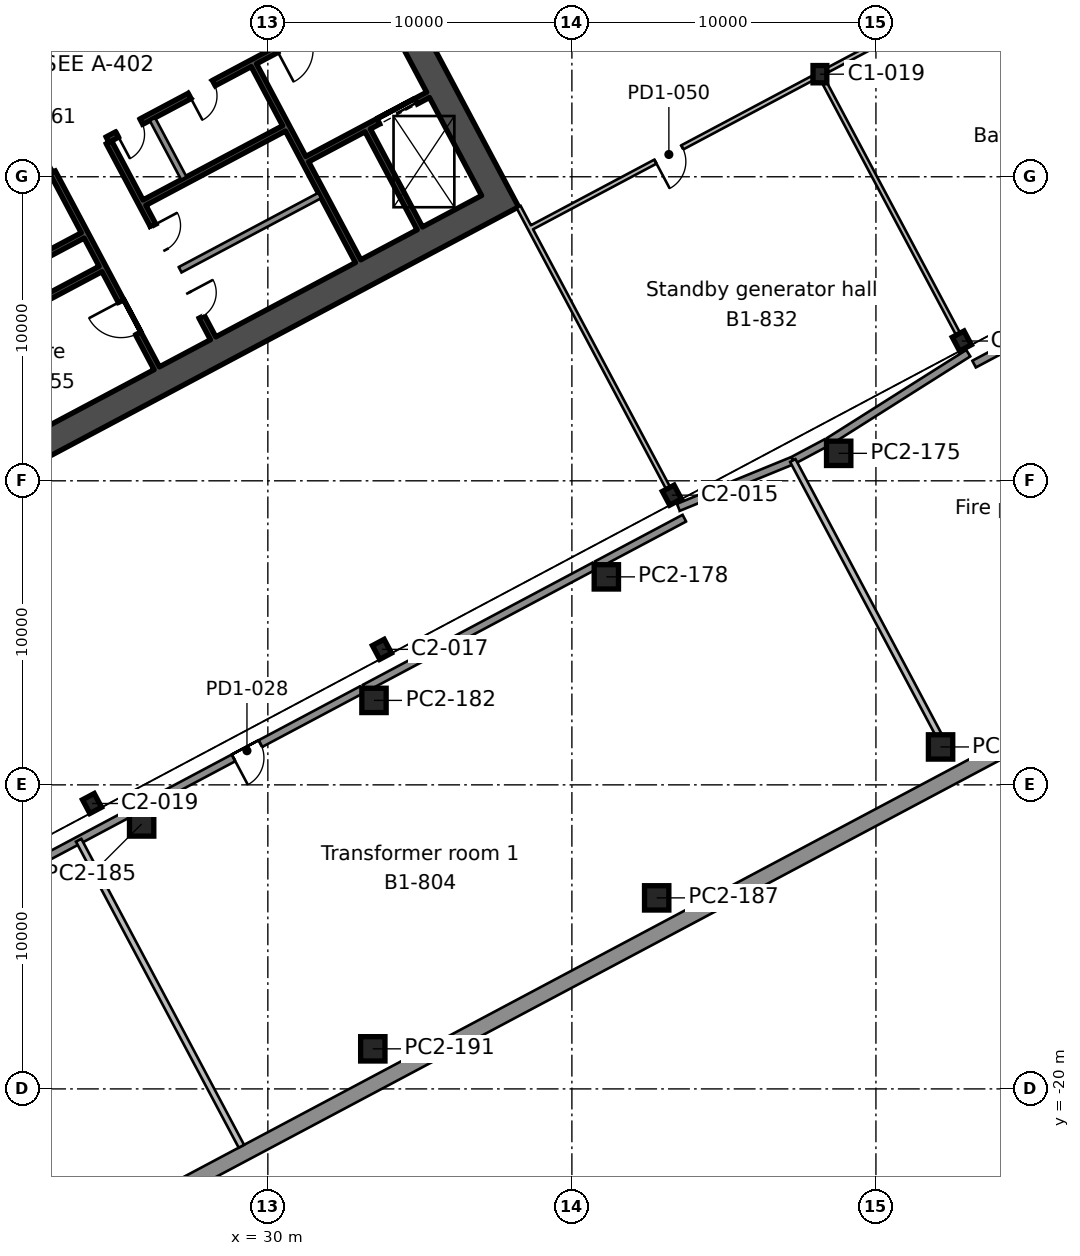
"""IFC4 building model, lengths in metres.
Left out: names, types, materials, properties, quantities, classifications, styles, units other than length and angle.
Written with IfcOpenShell. Run it as: python <this file> out.ifc"""

import sys

from ifc_helpers import new_model, si_unit, direction, frame, frame_2d, origin, origin_2d, place, context, subcontext, project, spatial, rectangle, i_section, extrude, element, fill, save


model = new_model("IFC4")
c1 = context("Model", 3, precision=1e-05, world=origin(), true_north=direction((0.0, 1.0)))
c2 = subcontext(c1, "Body", "Model", "MODEL_VIEW")
j1 = project(units=[si_unit("LENGTHUNIT", "METRE"), si_unit("PLANEANGLEUNIT", "RADIAN")], contexts=[c1])
p1 = place(None, origin())
s1 = spatial("IfcSite", under=j1, at=p1, CompositionType="ELEMENT")
p2 = place(p1, origin())
s2 = spatial("IfcBuilding", under=s1, at=p2, CompositionType="ELEMENT")
p3 = place(p2, frame((0.0, 0.0, -4.5)))
s3 = spatial("IfcBuildingStorey", under=s2, at=p3, CompositionType="ELEMENT", Elevation=-4.5)
for number, where, z_axis, x_axis in (
    (1, (24.217, -10.613, 0.0), (0.0, 0.0, 1.0), (0.883, 0.469, 0.0)),
    (2, (33.753, -5.543, 0.0), (0.0, 0.0, 1.0), (0.883, 0.469, 0.0)),
    (3, (43.289, -0.472, 0.0), (0.0, 0.0, 1.0), (0.883, 0.469, 0.0)),
    (4, (52.825, 4.598, 0.0), (0.0, 0.0, 1.0), (0.883, 0.469, 0.0)),
):
    element("IfcColumn", number, at=place(p3, frame(where, z_axis=z_axis, x_axis=x_axis)), inside=s3, PredefinedType="COLUMN", context=c2, shape_type="SweptSolid", body=[
        extrude(i_section(OverallWidth=0.437, OverallDepth=0.513, WebThickness=0.061, FlangeThickness=0.097, FilletRadius=0.015, at=origin_2d()), origin(), (0.0, 0.0, 1.0), 4.5),
    ])
p4 = place(p3, frame((48.158, 13.374, 0.0), z_axis=(0.0, 0.0, 1.0), x_axis=(1.0, 0.0, 0.0)))
e5 = element("IfcColumn", 5, at=p4, inside=s3, PredefinedType="COLUMN", context=c2, shape_type="SweptSolid", body=[
    extrude(i_section(OverallWidth=0.455, OverallDepth=0.569, WebThickness=0.078, FlangeThickness=0.125, FilletRadius=0.015, at=origin_2d()), origin(), (0.0, 0.0, 1.0), 4.5),
])
p5 = place(p3, frame((37.849, 8.799, 0.0), z_axis=(0.0, 0.0, 1.0), x_axis=(-0.469465789982, 0.882950662289, 0.0)))
e6 = element("IfcWall", 6, at=p5, inside=s3, PredefinedType="SHEAR", context=c2, shape_type="SweptSolid", body=[
    extrude(rectangle(XDim=20.0, YDim=0.9, at=frame_2d((10.0, 0.0))), origin(), (0.0, 0.0, 1.0), 4.5),
])
p6 = place(p5, frame((10.6, 0.0, 0.0)))
e7 = element("IfcOpeningElement", 7, at=p6, cuts=e6, PredefinedType="OPENING", context=c2, shape_type="SweptSolid", body=[
    extrude(rectangle(XDim=2.4, YDim=2.4, at=frame_2d((1.2, 1.2))), frame((0.0, 0.46, 0.0), z_axis=(0.0, -1.0, 0.0), x_axis=(1.0, 0.0, 0.0)), (0.0, 0.0, 1.0), 0.92),
])
p7 = place(p3, frame((19.405, -0.498, 0.0), z_axis=(0.0, 0.0, 1.0), x_axis=(0.88294509198, 0.469476266226, 0.0)))
e8 = element("IfcWall", 8, at=p7, inside=s3, PredefinedType="SHEAR", context=c2, shape_type="SweptSolid", body=[
    extrude(rectangle(XDim=20.2, YDim=0.9, at=frame_2d((10.1, 0.0))), origin(), (0.0, 0.0, 1.0), 4.5),
])
p8 = place(p3, frame((26.346, 3.702, 0.0), z_axis=(0.0, 0.0, 1.0), x_axis=(-0.469480409012, 0.88294288918, 0.0)))
e9 = element("IfcWall", 9, at=p8, inside=s3, PredefinedType="SHEAR", context=c2, shape_type="SweptSolid", body=[
    extrude(rectangle(XDim=7.3, YDim=0.2, at=frame_2d((3.65, 0.0))), origin(), (0.0, 0.0, 1.0), 4.5),
])
p9 = place(p8, frame((1.3, 0.0, 0.0)))
e10 = element("IfcOpeningElement", 10, at=p9, cuts=e9, PredefinedType="OPENING", context=c2, shape_type="SweptSolid", body=[
    extrude(rectangle(XDim=1.2, YDim=2.1, at=frame_2d((0.6, 1.05))), frame((0.0, 0.11, 0.0), z_axis=(0.0, -1.0, 0.0), x_axis=(1.0, 0.0, 0.0)), (0.0, 0.0, 1.0), 0.22),
])
p10 = place(p3, frame((28.2, 4.688, 0.0), z_axis=(0.0, 0.0, 1.0), x_axis=(-0.469454336211, 0.882956752176, 0.0)))
e11 = element("IfcWall", 11, at=p10, inside=s3, PredefinedType="SHEAR", context=c2, shape_type="SweptSolid", body=[
    extrude(rectangle(XDim=7.3, YDim=0.2, at=frame_2d((3.65, 0.0))), origin(), (0.0, 0.0, 1.0), 4.5),
])
p11 = place(p10, frame((0.8, 0.0, 0.0)))
e12 = element("IfcOpeningElement", 12, at=p11, cuts=e11, PredefinedType="OPENING", context=c2, shape_type="SweptSolid", body=[
    extrude(rectangle(XDim=0.9, YDim=2.1, at=frame_2d((0.45, 1.05))), frame((0.0, 0.11, 0.0), z_axis=(0.0, -1.0, 0.0), x_axis=(1.0, 0.0, 0.0)), (0.0, 0.0, 1.0), 0.22),
])
p12 = place(p10, frame((3.3, 0.0, 0.0)))
e13 = element("IfcOpeningElement", 13, at=p12, cuts=e11, PredefinedType="OPENING", context=c2, shape_type="SweptSolid", body=[
    extrude(rectangle(XDim=0.9, YDim=2.1, at=frame_2d((0.45, 1.05))), frame((0.0, 0.11, 0.0), z_axis=(0.0, -1.0, 0.0), x_axis=(1.0, 0.0, 0.0)), (0.0, 0.0, 1.0), 0.22),
])
p13 = place(p3, frame((27.236, 9.951, 0.0), z_axis=(0.0, 0.0, 1.0), x_axis=(-0.4694473164, 0.882960484464, 0.0)))
e14 = element("IfcWall", 14, at=p13, inside=s3, PredefinedType="SOLIDWALL", context=c2, shape_type="SweptSolid", body=[
    extrude(rectangle(XDim=2.2, YDim=0.2, at=frame_2d((1.1, 0.0))), origin(), (0.0, 0.0, 1.0), 4.5),
])
p14 = place(p3, frame((32.968, 7.223, 0.0), z_axis=(0.0, 0.0, 1.0), x_axis=(-0.469480409012, 0.88294288918, 0.0)))
e15 = element("IfcWall", 15, at=p14, inside=s3, PredefinedType="SHEAR", context=c2, shape_type="SweptSolid", body=[
    extrude(rectangle(XDim=7.3, YDim=0.2, at=frame_2d((3.65, 0.0))), origin(), (0.0, 0.0, 1.0), 4.5),
])
p15 = place(p3, frame((34.999, 8.303, 0.0), z_axis=(0.0, 0.0, 1.0), x_axis=(-0.4694665462, 0.882950260207, 0.0)))
e16 = element("IfcWall", 16, at=p15, inside=s3, PredefinedType="SHEAR", context=c2, shape_type="SweptSolid", body=[
    extrude(rectangle(XDim=3.65, YDim=0.2, at=frame_2d((1.825, 0.0))), origin(), (0.0, 0.0, 1.0), 4.5),
])
p16 = place(p3, frame((27.115, 6.942, 0.0), z_axis=(0.0, 0.0, 1.0), x_axis=(0.882934506056, 0.469496174655, 0.0)))
e17 = element("IfcWall", 17, at=p16, inside=s3, PredefinedType="SOLIDWALL", context=c2, shape_type="SweptSolid", body=[
    extrude(rectangle(XDim=5.2, YDim=0.2, at=frame_2d((2.6, 0.0))), origin(), (0.0, 0.0, 1.0), 4.5),
])
p17 = place(p3, frame((17.434, 3.21, 0.0), z_axis=(0.0, 0.0, 1.0), x_axis=(0.882940221191, 0.469485426614, 0.0)))
e18 = element("IfcWall", 18, at=p17, inside=s3, PredefinedType="SHEAR", context=c2, shape_type="SweptSolid", body=[
    extrude(rectangle(XDim=8.0, YDim=0.2, at=frame_2d((4.0, 0.0))), origin(), (0.0, 0.0, 1.0), 4.5),
])
p18 = place(p3, frame((31.296, 10.581, 0.0), z_axis=(0.0, 0.0, 1.0), x_axis=(0.882960433586, 0.469447412093, 0.0)))
e19 = element("IfcWall", 19, at=p18, inside=s3, PredefinedType="SHEAR", context=c2, shape_type="SweptSolid", body=[
    extrude(rectangle(XDim=4.5, YDim=0.2, at=frame_2d((2.25, 0.0))), origin(), (0.0, 0.0, 1.0), 4.5),
])
p19 = place(p18, frame((2.65, 0.0, 0.0)))
e20 = element("IfcOpeningElement", 20, at=p19, cuts=e19, PredefinedType="OPENING", context=c2, shape_type="SweptSolid", body=[
    extrude(rectangle(XDim=1.4, YDim=2.4, at=frame_2d((0.7, 1.2))), frame((0.0, 0.11, 0.0), z_axis=(0.0, -1.0, 0.0), x_axis=(1.0, 0.0, 0.0)), (0.0, 0.0, 1.0), 0.22),
])
p20 = place(p3, frame((16.847, 4.314, 0.0), z_axis=(0.0, 0.0, 1.0), x_axis=(0.882940221191, 0.469485426614, 0.0)))
e21 = element("IfcWall", 21, at=p20, inside=s3, PredefinedType="SHEAR", context=c2, shape_type="SweptSolid", body=[
    extrude(rectangle(XDim=8.0, YDim=0.2, at=frame_2d((4.0, 0.0))), origin(), (0.0, 0.0, 1.0), 4.5),
])
p21 = place(p3, frame((25.941, 9.15, 0.0), z_axis=(0.0, 0.0, 1.0), x_axis=(0.882953967957, 0.469459572775, 0.0)))
e22 = element("IfcWall", 22, at=p21, inside=s3, PredefinedType="SHEAR", context=c2, shape_type="SweptSolid", body=[
    extrude(rectangle(XDim=5.2, YDim=0.2, at=frame_2d((2.6, 0.0))), origin(), (0.0, 0.0, 1.0), 4.5),
])
p22 = place(p3, frame((24.726, 11.222, 0.0), z_axis=(0.0, 0.0, 1.0), x_axis=(0.882940221191, 0.469485426614, 0.0)))
e23 = element("IfcWall", 23, at=p22, inside=s3, PredefinedType="SHEAR", context=c2, shape_type="SweptSolid", body=[
    extrude(rectangle(XDim=10.0, YDim=0.2, at=frame_2d((5.0, 0.0))), origin(), (0.0, 0.0, 1.0), 4.5),
])
p23 = place(p22, frame((6.3, 0.0, 0.0)))
e24 = element("IfcOpeningElement", 24, at=p23, cuts=e23, PredefinedType="OPENING", context=c2, shape_type="SweptSolid", body=[
    extrude(rectangle(XDim=1.2, YDim=2.1, at=frame_2d((0.6, 1.05))), frame((0.0, 0.11, 0.0), z_axis=(0.0, -1.0, 0.0), x_axis=(1.0, 0.0, 0.0)), (0.0, 0.0, 1.0), 0.22),
])
p24 = place(p22, frame((0.36, 0.0, 0.0)))
e25 = element("IfcOpeningElement", 25, at=p24, cuts=e23, PredefinedType="OPENING", context=c2, shape_type="SweptSolid", body=[
    extrude(rectangle(XDim=0.9, YDim=2.1, at=frame_2d((0.45, 1.05))), frame((0.0, 0.11, 0.0), z_axis=(0.0, -1.0, 0.0), x_axis=(1.0, 0.0, 0.0)), (0.0, 0.0, 1.0), 0.22),
])
p25 = place(p22, frame((3.06, 0.0, 0.0)))
e26 = element("IfcOpeningElement", 26, at=p25, cuts=e23, PredefinedType="OPENING", context=c2, shape_type="SweptSolid", body=[
    extrude(rectangle(XDim=0.9, YDim=2.1, at=frame_2d((0.45, 1.05))), frame((0.0, 0.11, 0.0), z_axis=(0.0, -1.0, 0.0), x_axis=(1.0, 0.0, 0.0)), (0.0, 0.0, 1.0), 0.22),
])
p26 = place(p3, frame((14.124, 9.435, 0.0), z_axis=(0.0, 0.0, 1.0), x_axis=(0.882940221191, 0.469485426614, 0.0)))
e27 = element("IfcWall", 27, at=p26, inside=s3, PredefinedType="SHEAR", context=c2, shape_type="SweptSolid", body=[
    extrude(rectangle(XDim=10.0, YDim=0.2, at=frame_2d((5.0, 0.0))), origin(), (0.0, 0.0, 1.0), 4.5),
])
p27 = place(p26, frame((2.1, 0.0, 0.0)))
e28 = element("IfcOpeningElement", 28, at=p27, cuts=e27, PredefinedType="OPENING", context=c2, shape_type="SweptSolid", body=[
    extrude(rectangle(XDim=1.2, YDim=2.1, at=frame_2d((0.6, 1.05))), frame((0.0, 0.11, 0.0), z_axis=(0.0, -1.0, 0.0), x_axis=(1.0, 0.0, 0.0)), (0.0, 0.0, 1.0), 0.22),
])
p28 = place(p3, frame((5.703, -34.625, 0.0), z_axis=(0.0, 0.0, 1.0), x_axis=(0.882947521781, 0.469471696464, 0.0)))
e29 = element("IfcWall", 29, at=p28, inside=s3, PredefinedType="SOLIDWALL", context=c2, shape_type="SweptSolid", body=[
    extrude(rectangle(XDim=85.294, YDim=0.5, at=frame_2d((42.647, 0.0))), origin(), (0.0, 0.0, 1.0), 4.5),
])
for number, where, z_axis, x_axis in (
    (30, (33.452, -18.682, 0.0), (0.0, 0.0, 1.0), (1.0, 0.0, 0.0)),
    (31, (42.789, -13.717, 0.0), (0.0, 0.0, 1.0), (1.0, 0.0, 0.0)),
    (32, (25.849, -11.286, 0.0), (0.0, 0.0, 1.0), (1.0, 0.0, 0.0)),
    (33, (52.126, -8.753, 0.0), (0.0, 0.0, 1.0), (1.0, 0.0, 0.0)),
    (34, (33.491, -7.222, 0.0), (0.0, 0.0, 1.0), (1.0, 0.0, 0.0)),
    (35, (41.133, -3.159, 0.0), (0.0, 0.0, 1.0), (1.0, 0.0, 0.0)),
    (36, (48.775, 0.904, 0.0), (0.0, 0.0, 1.0), (1.0, 0.0, 0.0)),
):
    element("IfcColumn", number, at=place(p3, frame(where, z_axis=z_axis, x_axis=x_axis)), inside=s3, PredefinedType="COLUMN", context=c2, shape_type="SweptSolid", body=[
        extrude(rectangle(XDim=0.8, YDim=0.8, at=origin_2d()), origin(), (0.0, 0.0, 1.0), 4.05),
    ])
p29 = place(p3, frame((29.129, -21.886, 0.0), z_axis=(0.0, 0.0, 1.0), x_axis=(-0.469474097874, 0.882946244924, 0.0)))
e37 = element("IfcWall", 37, at=p29, inside=s3, PredefinedType="PARTITIONING", context=c2, shape_type="SweptSolid", body=[
    extrude(rectangle(XDim=11.4, YDim=0.2, at=frame_2d((5.7, 0.0))), origin(), (0.0, 0.0, 1.0), 4.05),
])
p30 = place(p3, frame((23.781, -11.819, 0.0), z_axis=(0.0, 0.0, 1.0), x_axis=(-0.882996705644, -0.469379183413, 0.0)))
e38 = element("IfcWall", 38, at=p30, inside=s3, PredefinedType="SOLIDWALL", context=c2, shape_type="SweptSolid", body=[
    extrude(rectangle(XDim=6.668, YDim=0.25, at=frame_2d((3.334, 0.0))), origin(), (0.0, 0.0, 1.0), 4.05),
])
p31 = place(p3, frame((52.063, -8.353, 0.0), z_axis=(0.0, 0.0, 1.0), x_axis=(-0.469467926311, 0.882949526397, 0.0)))
e39 = element("IfcWall", 39, at=p31, inside=s3, PredefinedType="PARTITIONING", context=c2, shape_type="SweptSolid", body=[
    extrude(rectangle(XDim=10.217, YDim=0.2, at=frame_2d((5.109, 0.0))), origin(), (0.0, 0.0, 1.0), 4.05),
])
p32 = place(p3, frame((47.27, 0.67, 0.0), z_axis=(0.0, 0.0, 1.0), x_axis=(-0.925490593681, -0.378770591531, 0.0)))
e40 = element("IfcWall", 40, at=p32, inside=s3, PredefinedType="SOLIDWALL", context=c2, shape_type="SweptSolid", body=[
    extrude(rectangle(XDim=4.072, YDim=0.25, at=frame_2d((2.036, 0.0))), origin(), (0.0, 0.0, 1.0), 4.05),
])
p33 = place(p3, frame((43.699, -1.229, 0.0), z_axis=(0.0, 0.0, 1.0), x_axis=(-0.882959571528, -0.469449033492, 0.0)))
e41 = element("IfcWall", 41, at=p33, inside=s3, PredefinedType="SOLIDWALL", context=c2, shape_type="SweptSolid", body=[
    extrude(rectangle(XDim=3.26, YDim=0.25, at=frame_2d((1.63, 0.0))), origin(), (0.0, 0.0, 1.0), 4.05),
])
p34 = place(p3, frame((40.733, -2.805, 0.0), z_axis=(0.0, 0.0, 1.0), x_axis=(-0.882943115894, -0.469479982635, 0.0)))
e42 = element("IfcWall", 42, at=p34, inside=s3, PredefinedType="SOLIDWALL", context=c2, shape_type="SweptSolid", body=[
    extrude(rectangle(XDim=8.555, YDim=0.25, at=frame_2d((4.278, 0.0))), origin(), (0.0, 0.0, 1.0), 4.05),
])
p35 = place(p3, frame((33.091, -6.869, 0.0), z_axis=(0.0, 0.0, 1.0), x_axis=(-0.882945366868, -0.469475749243, 0.0)))
e43 = element("IfcWall", 43, at=p35, inside=s3, PredefinedType="SOLIDWALL", context=c2, shape_type="SweptSolid", body=[
    extrude(rectangle(XDim=8.557, YDim=0.25, at=frame_2d((4.279, 0.0))), origin(), (0.0, 0.0, 1.0), 4.05),
])
p36 = place(p35, frame((3.779, 0.0, 0.0)))
e44 = element("IfcOpeningElement", 44, at=p36, cuts=e43, PredefinedType="OPENING", context=c2, shape_type="SweptSolid", body=[
    extrude(rectangle(XDim=1.0, YDim=2.1, at=frame_2d((0.5, 1.05))), frame((0.0, 0.135, 0.0), z_axis=(0.0, -1.0, 0.0), x_axis=(1.0, 0.0, 0.0)), (0.0, 0.0, 1.0), 0.27),
])
p37 = place(p3, frame((25.449, -10.932, 0.0), z_axis=(0.0, 0.0, 1.0), x_axis=(-0.882889505907, -0.469580792153, 0.0)))
e45 = element("IfcWall", 45, at=p37, inside=s3, PredefinedType="SOLIDWALL", context=c2, shape_type="SweptSolid", body=[
    extrude(rectangle(XDim=1.887, YDim=0.25, at=frame_2d((0.944, 0.0))), origin(), (0.0, 0.0, 1.0), 4.05),
])
p38 = place(p3, frame((53.037, 4.198, 0.0), z_axis=(0.0, 0.0, 1.0), x_axis=(-0.845143693755, -0.534539181825, 0.0)))
e46 = element("IfcWall", 46, at=p38, inside=s3, PredefinedType="SOLIDWALL", context=c2, shape_type="SweptSolid", body=[
    extrude(rectangle(XDim=5.414, YDim=0.25, at=frame_2d((2.707, 0.0))), origin(), (0.0, 0.0, 1.0), 4.05),
])
p39 = place(p3, frame((48.375, 1.258, 0.0), z_axis=(0.0, 0.0, 1.0), x_axis=(-0.883006084416, -0.469361539631, 0.0)))
e47 = element("IfcWall", 47, at=p39, inside=s3, PredefinedType="SOLIDWALL", context=c2, shape_type="SweptSolid", body=[
    extrude(rectangle(XDim=1.24, YDim=0.25, at=frame_2d((0.62, 0.0))), origin(), (0.0, 0.0, 1.0), 4.05),
])
p40 = place(p3, frame((56.017, 5.321, 0.0), z_axis=(0.0, 0.0, 1.0), x_axis=(-0.882921481106, -0.469520668555, 0.0)))
e48 = element("IfcWall", 48, at=p40, inside=s3, PredefinedType="SOLIDWALL", context=c2, shape_type="SweptSolid", body=[
    extrude(rectangle(XDim=3.158, YDim=0.25, at=frame_2d((1.579, 0.0))), origin(), (0.0, 0.0, 1.0), 4.05),
])
p41 = place(p3, frame((38.622, 8.304, 0.0), z_axis=(0.0, 0.0, 1.0), x_axis=(0.882956451437, 0.469454901845, 0.0)))
e49 = element("IfcWall", 49, at=p41, inside=s3, PredefinedType="PARTITIONING", context=c2, shape_type="SweptSolid", body=[
    extrude(rectangle(XDim=10.502, YDim=0.15, at=frame_2d((5.251, 0.0))), origin(), (0.0, 0.0, 1.0), 4.05),
])
p42 = place(p41, frame((4.673, 0.0, 0.0)))
e50 = element("IfcOpeningElement", 50, at=p42, cuts=e49, PredefinedType="OPENING", context=c2, shape_type="SweptSolid", body=[
    extrude(rectangle(XDim=1.0, YDim=2.1, at=frame_2d((0.5, 1.05))), frame((0.0, 0.085, 0.0), z_axis=(0.0, -1.0, 0.0), x_axis=(1.0, 0.0, 0.0)), (0.0, 0.0, 1.0), 0.17),
])
p43 = place(p3, frame((48.421, 13.514, 0.0), z_axis=(0.0, 0.0, 1.0), x_axis=(0.882940965658, 0.469484026526, 0.0)))
e51 = element("IfcWall", 51, at=p43, inside=s3, PredefinedType="PARTITIONING", context=c2, shape_type="SweptSolid", body=[
    extrude(rectangle(XDim=10.205, YDim=0.15, at=frame_2d((5.103, 0.0))), origin(), (0.0, 0.0, 1.0), 4.05),
])
p44 = place(p43, frame((4.603, 0.0, 0.0)))
e52 = element("IfcOpeningElement", 52, at=p44, cuts=e51, PredefinedType="OPENING", context=c2, shape_type="SweptSolid", body=[
    extrude(rectangle(XDim=1.0, YDim=2.1, at=frame_2d((0.5, 1.05))), frame((0.0, 0.085, 0.0), z_axis=(0.0, -1.0, 0.0), x_axis=(1.0, 0.0, 0.0)), (0.0, 0.0, 1.0), 0.17),
])
p45 = place(p3, frame((38.247, 9.01, 0.0), z_axis=(0.0, 0.0, 1.0), x_axis=(0.469454908155, -0.882956448082, 0.0)))
e53 = element("IfcWall", 53, at=p45, inside=s3, PredefinedType="PARTITIONING", context=c2, shape_type="SweptSolid", body=[
    extrude(rectangle(XDim=0.794, YDim=0.15, at=frame_2d((0.397, 0.0))), origin(), (0.0, 0.0, 1.0), 4.05),
])
p46 = place(p3, frame((52.704, 4.824, 0.0), z_axis=(0.0, 0.0, 1.0), x_axis=(-0.469494001944, 0.882935661381, 0.0)))
e54 = element("IfcWall", 54, at=p46, inside=s3, PredefinedType="PARTITIONING", context=c2, shape_type="SweptSolid", body=[
    extrude(rectangle(XDim=9.325, YDim=0.15, at=frame_2d((4.663, 0.0))), origin(), (0.0, 0.0, 1.0), 4.05),
])
p47 = place(p3, frame((38.62, 8.308, 0.0), z_axis=(0.0, 0.0, 1.0), x_axis=(0.469473365889, -0.882946634129, 0.0)))
e55 = element("IfcWall", 55, at=p47, inside=s3, PredefinedType="PARTITIONING", context=c2, shape_type="SweptSolid", body=[
    extrude(rectangle(XDim=9.687, YDim=0.15, at=frame_2d((4.844, 0.0))), origin(), (0.0, 0.0, 1.0), 4.05),
])
p48 = place(p9, origin())
e56 = element("IfcDoor", 56, at=p48, inside=s3, OperationType="SINGLE_SWING_RIGHT", PredefinedType="DOOR", context=c2, shape_type="SweptSolid", body=[
    extrude(rectangle(XDim=1.2, YDim=2.1, at=frame_2d((0.6, 1.05))), frame((0.0, 0.025, 0.0), z_axis=(0.0, -1.0, 0.0), x_axis=(1.0, 0.0, 0.0)), (0.0, 0.0, 1.0), 0.05),
])
fill(e10, e56)
p49 = place(p24, frame((0.9, 0.0, 0.0), z_axis=(0.0, 0.0, 1.0), x_axis=(-1.0, 0.0, 0.0)))
e57 = element("IfcDoor", 57, at=p49, inside=s3, OperationType="SINGLE_SWING_RIGHT", PredefinedType="DOOR", context=c2, shape_type="SweptSolid", body=[
    extrude(rectangle(XDim=0.9, YDim=2.1, at=frame_2d((0.45, 1.05))), frame((0.0, 0.025, 0.0), z_axis=(0.0, -1.0, 0.0), x_axis=(1.0, 0.0, 0.0)), (0.0, 0.0, 1.0), 0.05),
])
fill(e25, e57)
p50 = place(p25, frame((0.9, 0.0, 0.0), z_axis=(0.0, 0.0, 1.0), x_axis=(-1.0, 0.0, 0.0)))
e58 = element("IfcDoor", 58, at=p50, inside=s3, OperationType="SINGLE_SWING_RIGHT", PredefinedType="DOOR", context=c2, shape_type="SweptSolid", body=[
    extrude(rectangle(XDim=0.9, YDim=2.1, at=frame_2d((0.45, 1.05))), frame((0.0, 0.025, 0.0), z_axis=(0.0, -1.0, 0.0), x_axis=(1.0, 0.0, 0.0)), (0.0, 0.0, 1.0), 0.05),
])
fill(e26, e58)
p51 = place(p19, origin())
e59 = element("IfcDoor", 59, at=p51, inside=s3, OperationType="DOUBLE_DOOR_SLIDING", PredefinedType="DOOR", context=c2, shape_type="SweptSolid", body=[
    extrude(rectangle(XDim=1.4, YDim=2.4, at=frame_2d((0.7, 1.2))), frame((0.0, 0.025, 0.0), z_axis=(0.0, -1.0, 0.0), x_axis=(1.0, 0.0, 0.0)), (0.0, 0.0, 1.0), 0.05),
])
fill(e20, e59)
p52 = place(p11, frame((0.9, 0.0, 0.0), z_axis=(0.0, 0.0, 1.0), x_axis=(-1.0, 0.0, 0.0)))
e60 = element("IfcDoor", 60, at=p52, inside=s3, OperationType="SINGLE_SWING_LEFT", PredefinedType="DOOR", context=c2, shape_type="SweptSolid", body=[
    extrude(rectangle(XDim=0.9, YDim=2.1, at=frame_2d((0.45, 1.05))), frame((0.0, 0.025, 0.0), z_axis=(0.0, -1.0, 0.0), x_axis=(1.0, 0.0, 0.0)), (0.0, 0.0, 1.0), 0.05),
])
fill(e12, e60)
p53 = place(p12, frame((0.9, 0.0, 0.0), z_axis=(0.0, 0.0, 1.0), x_axis=(-1.0, 0.0, 0.0)))
e61 = element("IfcDoor", 61, at=p53, inside=s3, OperationType="SINGLE_SWING_LEFT", PredefinedType="DOOR", context=c2, shape_type="SweptSolid", body=[
    extrude(rectangle(XDim=0.9, YDim=2.1, at=frame_2d((0.45, 1.05))), frame((0.0, 0.025, 0.0), z_axis=(0.0, -1.0, 0.0), x_axis=(1.0, 0.0, 0.0)), (0.0, 0.0, 1.0), 0.05),
])
fill(e13, e61)
p54 = place(p42, frame((1.0, 0.0, 0.0), z_axis=(0.0, 0.0, 1.0), x_axis=(-1.0, 0.0, 0.0)))
e62 = element("IfcDoor", 62, at=p54, inside=s3, OperationType="SINGLE_SWING_RIGHT", PredefinedType="DOOR", context=c2, shape_type="SweptSolid", body=[
    extrude(rectangle(XDim=1.0, YDim=2.1, at=frame_2d((0.5, 1.05))), frame((0.0, 0.025, 0.0), z_axis=(0.0, -1.0, 0.0), x_axis=(1.0, 0.0, 0.0)), (0.0, 0.0, 1.0), 0.05),
])
fill(e50, e62)
p55 = place(p36, origin())
e63 = element("IfcDoor", 63, at=p55, inside=s3, OperationType="SINGLE_SWING_RIGHT", PredefinedType="DOOR", context=c2, shape_type="SweptSolid", body=[
    extrude(rectangle(XDim=1.0, YDim=2.1, at=frame_2d((0.5, 1.05))), frame((0.0, 0.025, 0.0), z_axis=(0.0, -1.0, 0.0), x_axis=(1.0, 0.0, 0.0)), (0.0, 0.0, 1.0), 0.05),
])
fill(e44, e63)
save(model, sys.argv[1])
